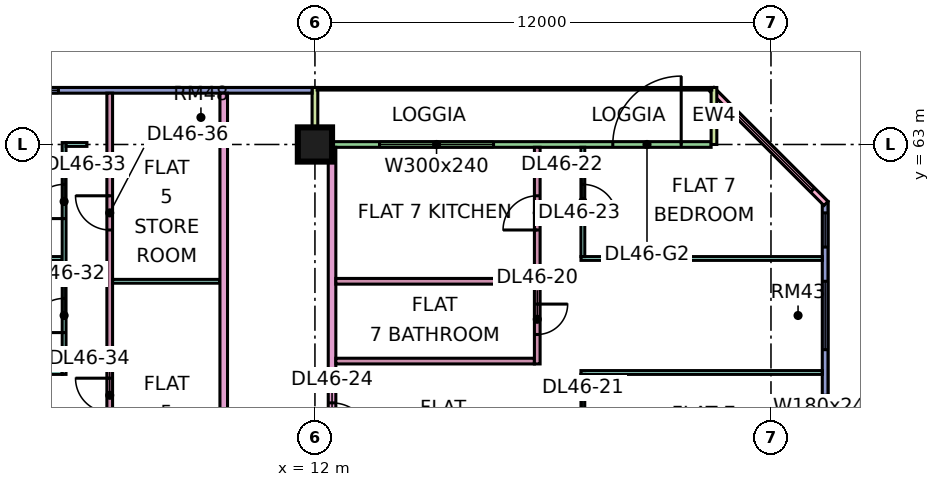
"""IFC4 building model, lengths in metres.
Left out: names, types, materials, properties, quantities, classifications, styles, units other than length and angle.
Written with IfcOpenShell. Run it as: python <this file> out.ifc"""

import sys

from ifc_helpers import new_model, si_unit, direction, frame, frame_2d, origin, origin_2d, place, context, subcontext, project, spatial, rectangle, extrude, element, fill, save


model = new_model("IFC4")
c1 = context("Model", 3, precision=1e-05, world=origin(), true_north=direction((0.0, 1.0)))
c2 = subcontext(c1, "Body", "Model", "MODEL_VIEW")
j1 = project(units=[si_unit("LENGTHUNIT", "METRE"), si_unit("PLANEANGLEUNIT", "RADIAN")], contexts=[c1])
p1 = place(None, origin())
s1 = spatial("IfcSite", under=j1, at=p1, CompositionType="ELEMENT")
p2 = place(p1, origin())
s2 = spatial("IfcBuilding", under=s1, at=p2, CompositionType="ELEMENT")
p3 = place(p2, frame((0.0, 0.0, 198.65)))
s3 = spatial("IfcBuildingStorey", under=s2, at=p3, CompositionType="ELEMENT", Elevation=198.65)
p4 = place(p3, frame((12.0, 63.0, 0.0), z_axis=(0.0, 0.0, 1.0), x_axis=(1.0, 0.0, 0.0)))
e1 = element("IfcColumn", 1, at=p4, inside=s3, PredefinedType="COLUMN", context=c2, shape_type="SweptSolid", body=[
    extrude(rectangle(XDim=0.9, YDim=0.9, at=origin_2d()), origin(), (0.0, 0.0, 1.0), 3.75),
])
p5 = place(p3, frame((25.425, 48.075, 0.0), z_axis=(0.0, 0.0, 1.0), x_axis=(0.0, 1.0, 0.0)))
e2 = element("IfcWall", 2, at=p5, inside=s3, PredefinedType="SOLIDWALL", context=c2, shape_type="SweptSolid", body=[
    extrude(rectangle(XDim=13.425, YDim=0.15, at=frame_2d((6.712, 0.0))), origin(), (0.0, 0.0, 1.0), 3.35),
])
p6 = place(p5, frame((0.562, 0.0, 0.45)))
e3 = element("IfcOpeningElement", 3, at=p6, cuts=e2, PredefinedType="OPENING", context=c2, shape_type="SweptSolid", body=[
    extrude(rectangle(XDim=4.8, YDim=2.4, at=frame_2d((2.4, 1.2))), frame((0.0, 0.085, 0.0), z_axis=(0.0, -1.0, 0.0), x_axis=(1.0, 0.0, 0.0)), (0.0, 0.0, 1.0), 0.17),
])
p7 = place(p5, frame((6.525, 0.0, 0.45)))
e4 = element("IfcOpeningElement", 4, at=p7, cuts=e2, PredefinedType="OPENING", context=c2, shape_type="SweptSolid", body=[
    extrude(rectangle(XDim=1.8, YDim=2.4, at=frame_2d((0.9, 1.2))), frame((0.0, 0.085, 0.0), z_axis=(0.0, -1.0, 0.0), x_axis=(1.0, 0.0, 0.0)), (0.0, 0.0, 1.0), 0.17),
])
p8 = place(p5, frame((9.525, 0.0, 0.45)))
e5 = element("IfcOpeningElement", 5, at=p8, cuts=e2, PredefinedType="OPENING", context=c2, shape_type="SweptSolid", body=[
    extrude(rectangle(XDim=1.8, YDim=2.4, at=frame_2d((0.9, 1.2))), frame((0.0, 0.085, 0.0), z_axis=(0.0, -1.0, 0.0), x_axis=(1.0, 0.0, 0.0)), (0.0, 0.0, 1.0), 0.17),
])
p9 = place(p5, frame((12.225, 0.0, 0.45)))
e6 = element("IfcOpeningElement", 6, at=p9, cuts=e2, PredefinedType="OPENING", context=c2, shape_type="SweptSolid", body=[
    extrude(rectangle(XDim=0.9, YDim=2.4, at=frame_2d((0.45, 1.2))), frame((0.0, 0.085, 0.0), z_axis=(0.0, -1.0, 0.0), x_axis=(1.0, 0.0, 0.0)), (0.0, 0.0, 1.0), 0.17),
])
p10 = place(p3, frame((25.447, 61.447, 0.0), z_axis=(0.0, 0.0, 1.0), x_axis=(-0.707106781187, 0.707106781187, 0.0)))
e7 = element("IfcWall", 7, at=p10, inside=s3, PredefinedType="SOLIDWALL", context=c2, shape_type="SweptSolid", body=[
    extrude(rectangle(XDim=4.243, YDim=0.15, at=frame_2d((2.121, 0.0))), origin(), (0.0, 0.0, 1.0), 3.35),
])
p11 = place(p10, frame((0.498, 0.0, 0.45)))
e8 = element("IfcOpeningElement", 8, at=p11, cuts=e7, PredefinedType="OPENING", context=c2, shape_type="SweptSolid", body=[
    extrude(rectangle(XDim=3.0, YDim=2.4, at=frame_2d((1.5, 1.2))), frame((0.0, 0.085, 0.0), z_axis=(0.0, -1.0, 0.0), x_axis=(1.0, 0.0, 0.0)), (0.0, 0.0, 1.0), 0.17),
])
p12 = place(p3, frame((22.425, 63.0, 0.0), z_axis=(0.0, 0.0, 1.0), x_axis=(-1.0, 0.0, 0.0)))
e9 = element("IfcWall", 9, at=p12, inside=s3, PredefinedType="SOLIDWALL", context=c2, shape_type="SweptSolid", body=[
    extrude(rectangle(XDim=10.35, YDim=0.15, at=frame_2d((5.175, 0.0))), origin(), (0.0, 0.0, 1.0), 3.35),
])
p13 = place(p12, frame((0.788, 0.0, 0.0)))
e10 = element("IfcOpeningElement", 10, at=p13, cuts=e9, PredefinedType="OPENING", context=c2, shape_type="SweptSolid", body=[
    extrude(rectangle(XDim=1.8, YDim=2.4, at=frame_2d((0.9, 1.2))), frame((0.0, 0.085, 0.0), z_axis=(0.0, -1.0, 0.0), x_axis=(1.0, 0.0, 0.0)), (0.0, 0.0, 1.0), 0.17),
])
p14 = place(p12, frame((5.725, 0.0, 0.45)))
e11 = element("IfcOpeningElement", 11, at=p14, cuts=e9, PredefinedType="OPENING", context=c2, shape_type="SweptSolid", body=[
    extrude(rectangle(XDim=3.0, YDim=2.4, at=frame_2d((1.5, 1.2))), frame((0.0, 0.085, 0.0), z_axis=(0.0, -1.0, 0.0), x_axis=(1.0, 0.0, 0.0)), (0.0, 0.0, 1.0), 0.17),
])
for number, where, z_axis, x_axis in (
    (12, (22.5, 64.5, 0.0), (0.0, 0.0, 1.0), (0.0, -1.0, 0.0)),
    (13, (12.0, 64.5, 0.0), (0.0, 0.0, 1.0), (0.0, -1.0, 0.0)),
):
    element("IfcWall", number, at=place(p3, frame(where, z_axis=z_axis, x_axis=x_axis)), inside=s3, PredefinedType="SOLIDWALL", context=c2, shape_type="SweptSolid", body=[
        extrude(rectangle(XDim=1.5, YDim=0.15, at=frame_2d((0.75, 0.0))), origin(), (0.0, 0.0, 1.0), 3.35),
    ])
p15 = place(p3, frame((11.925, 64.425, 0.0), z_axis=(0.0, 0.0, 1.0), x_axis=(-1.0, 0.0, 0.0)))
e14 = element("IfcWall", 14, at=p15, inside=s3, PredefinedType="SOLIDWALL", context=c2, shape_type="SweptSolid", body=[
    extrude(rectangle(XDim=10.425, YDim=0.15, at=frame_2d((5.212, 0.0))), origin(), (0.0, 0.0, 1.0), 3.35),
])
p16 = place(p15, frame((6.675, 0.0, 0.45)))
e15 = element("IfcOpeningElement", 15, at=p16, cuts=e14, PredefinedType="OPENING", context=c2, shape_type="SweptSolid", body=[
    extrude(rectangle(XDim=3.0, YDim=2.4, at=frame_2d((1.5, 1.2))), frame((0.0, 0.085, 0.0), z_axis=(0.0, -1.0, 0.0), x_axis=(1.0, 0.0, 0.0)), (0.0, 0.0, 1.0), 0.17),
])
p17 = place(p3, frame((-1.351, 60.0, 0.0), z_axis=(0.0, 0.0, 1.0), x_axis=(1.0, 0.0, 0.0)))
e16 = element("IfcWall", 16, at=p17, inside=s3, PredefinedType="PARTITIONING", context=c2, shape_type="SweptSolid", body=[
    extrude(rectangle(XDim=6.701, YDim=0.1, at=frame_2d((3.351, 0.0))), origin(), (0.0, 0.0, 1.0), 3.35),
])
p18 = place(p3, frame((-1.35, 57.0, 0.0), z_axis=(0.0, 0.0, 1.0), x_axis=(1.0, 0.0, 0.0)))
e17 = element("IfcWall", 17, at=p18, inside=s3, PredefinedType="PARTITIONING", context=c2, shape_type="SweptSolid", body=[
    extrude(rectangle(XDim=6.7, YDim=0.1, at=frame_2d((3.35, 0.0))), origin(), (0.0, 0.0, 1.0), 3.35),
])
p19 = place(p3, frame((5.4, 56.95, 0.0), z_axis=(0.0, 0.0, 1.0), x_axis=(0.0, 1.0, 0.0)))
e18 = element("IfcWall", 18, at=p19, inside=s3, PredefinedType="PARTITIONING", context=c2, shape_type="SweptSolid", body=[
    extrude(rectangle(XDim=6.1, YDim=0.1, at=frame_2d((3.05, 0.0))), origin(), (0.0, 0.0, 1.0), 3.35),
])
p20 = place(p19, frame((1.1, 0.0, 0.0)))
e19 = element("IfcOpeningElement", 19, at=p20, cuts=e18, PredefinedType="OPENING", context=c2, shape_type="SweptSolid", body=[
    extrude(rectangle(XDim=0.9, YDim=2.1, at=frame_2d((0.45, 1.05))), frame((0.0, 0.06, 0.0), z_axis=(0.0, -1.0, 0.0), x_axis=(1.0, 0.0, 0.0)), (0.0, 0.0, 1.0), 0.12),
])
p21 = place(p19, frame((4.1, 0.0, 0.0)))
e20 = element("IfcOpeningElement", 20, at=p21, cuts=e18, PredefinedType="OPENING", context=c2, shape_type="SweptSolid", body=[
    extrude(rectangle(XDim=0.9, YDim=2.1, at=frame_2d((0.45, 1.05))), frame((0.0, 0.06, 0.0), z_axis=(0.0, -1.0, 0.0), x_axis=(1.0, 0.0, 0.0)), (0.0, 0.0, 1.0), 0.12),
])
p22 = place(p3, frame((5.45, 63.0, 0.0), z_axis=(0.0, 0.0, 1.0), x_axis=(1.0, 0.0, 0.0)))
e21 = element("IfcWall", 21, at=p22, inside=s3, PredefinedType="PARTITIONING", context=c2, shape_type="SweptSolid", body=[
    extrude(rectangle(XDim=0.55, YDim=0.1, at=frame_2d((0.275, 0.0))), origin(), (0.0, 0.0, 1.0), 3.35),
])
p23 = place(p3, frame((6.6, 51.225, 0.0), z_axis=(0.0, 0.0, 1.0), x_axis=(0.0, 1.0, 0.0)))
e22 = element("IfcWall", 22, at=p23, inside=s3, PredefinedType="PARTITIONING", context=c2, shape_type="SweptSolid", body=[
    extrude(rectangle(XDim=13.125, YDim=0.15, at=frame_2d((6.562, 0.0))), origin(), (0.0, 0.0, 1.0), 3.35),
])
p24 = place(p23, frame((4.725, 0.0, 0.0)))
e23 = element("IfcOpeningElement", 23, at=p24, cuts=e22, PredefinedType="OPENING", context=c2, shape_type="SweptSolid", body=[
    extrude(rectangle(XDim=0.9, YDim=2.1, at=frame_2d((0.45, 1.05))), frame((0.0, 0.085, 0.0), z_axis=(0.0, -1.0, 0.0), x_axis=(1.0, 0.0, 0.0)), (0.0, 0.0, 1.0), 0.17),
])
p25 = place(p23, frame((9.525, 0.0, 0.0)))
e24 = element("IfcOpeningElement", 24, at=p25, cuts=e22, PredefinedType="OPENING", context=c2, shape_type="SweptSolid", body=[
    extrude(rectangle(XDim=0.9, YDim=2.1, at=frame_2d((0.45, 1.05))), frame((0.0, 0.085, 0.0), z_axis=(0.0, -1.0, 0.0), x_axis=(1.0, 0.0, 0.0)), (0.0, 0.0, 1.0), 0.17),
])
p26 = place(p3, frame((6.675, 59.4, 0.0), z_axis=(0.0, 0.0, 1.0), x_axis=(1.0, 0.0, 0.0)))
e25 = element("IfcWall", 25, at=p26, inside=s3, PredefinedType="PARTITIONING", context=c2, shape_type="SweptSolid", body=[
    extrude(rectangle(XDim=2.825, YDim=0.1, at=frame_2d((1.413, 0.0))), origin(), (0.0, 0.0, 1.0), 3.35),
])
p27 = place(p3, frame((9.6, 20.0, 0.0), z_axis=(0.0, 0.0, 1.0), x_axis=(0.0, 1.0, 0.0)))
e26 = element("IfcWall", 26, at=p27, inside=s3, PredefinedType="PARTITIONING", context=c2, shape_type="SweptSolid", body=[
    extrude(rectangle(XDim=44.35, YDim=0.2, at=frame_2d((22.175, 0.0))), origin(), (0.0, 0.0, 1.0), 3.35),
])
p28 = place(p27, frame((17.1, 0.0, 0.0)))
e27 = element("IfcOpeningElement", 27, at=p28, cuts=e26, PredefinedType="OPENING", context=c2, shape_type="SweptSolid", body=[
    extrude(rectangle(XDim=1.0, YDim=2.1, at=frame_2d((0.5, 1.05))), frame((0.0, 0.11, 0.0), z_axis=(0.0, -1.0, 0.0), x_axis=(1.0, 0.0, 0.0)), (0.0, 0.0, 1.0), 0.22),
])
p29 = place(p27, frame((29.1, 0.0, 0.0)))
e28 = element("IfcOpeningElement", 28, at=p29, cuts=e26, PredefinedType="OPENING", context=c2, shape_type="SweptSolid", body=[
    extrude(rectangle(XDim=1.0, YDim=2.1, at=frame_2d((0.5, 1.05))), frame((0.0, 0.11, 0.0), z_axis=(0.0, -1.0, 0.0), x_axis=(1.0, 0.0, 0.0)), (0.0, 0.0, 1.0), 0.22),
])
p30 = place(p27, frame((0.6, 0.0, 0.0)))
e29 = element("IfcOpeningElement", 29, at=p30, cuts=e26, PredefinedType="OPENING", context=c2, shape_type="SweptSolid", body=[
    extrude(rectangle(XDim=1.2, YDim=2.1, at=frame_2d((0.6, 1.05))), frame((0.0, 0.11, 0.0), z_axis=(0.0, -1.0, 0.0), x_axis=(1.0, 0.0, 0.0)), (0.0, 0.0, 1.0), 0.22),
])
p31 = place(p27, frame((4.35, 0.0, 0.0)))
e30 = element("IfcOpeningElement", 30, at=p31, cuts=e26, PredefinedType="OPENING", context=c2, shape_type="SweptSolid", body=[
    extrude(rectangle(XDim=1.0, YDim=2.1, at=frame_2d((0.5, 1.05))), frame((0.0, 0.11, 0.0), z_axis=(0.0, -1.0, 0.0), x_axis=(1.0, 0.0, 0.0)), (0.0, 0.0, 1.0), 0.22),
])
p32 = place(p3, frame((12.45, 20.0, 0.0), z_axis=(0.0, 0.0, 1.0), x_axis=(0.0, 1.0, 0.0)))
e31 = element("IfcWall", 31, at=p32, inside=s3, PredefinedType="PARTITIONING", context=c2, shape_type="SweptSolid", body=[
    extrude(rectangle(XDim=42.926, YDim=0.2, at=frame_2d((21.463, 0.0))), origin(), (0.0, 0.0, 1.0), 3.35),
])
p33 = place(p32, frame((7.15, 0.0, 0.0)))
e32 = element("IfcOpeningElement", 32, at=p33, cuts=e31, PredefinedType="OPENING", context=c2, shape_type="SweptSolid", body=[
    extrude(rectangle(XDim=1.6, YDim=2.1, at=frame_2d((0.8, 1.05))), frame((0.0, 0.11, 0.0), z_axis=(0.0, -1.0, 0.0), x_axis=(1.0, 0.0, 0.0)), (0.0, 0.0, 1.0), 0.22),
])
p34 = place(p32, frame((13.5, 0.0, 0.0)))
e33 = element("IfcOpeningElement", 33, at=p34, cuts=e31, PredefinedType="OPENING", context=c2, shape_type="SweptSolid", body=[
    extrude(rectangle(XDim=1.0, YDim=2.1, at=frame_2d((0.5, 1.05))), frame((0.0, 0.11, 0.0), z_axis=(0.0, -1.0, 0.0), x_axis=(1.0, 0.0, 0.0)), (0.0, 0.0, 1.0), 0.22),
])
p35 = place(p32, frame((17.2, 0.0, 0.0)))
e34 = element("IfcOpeningElement", 34, at=p35, cuts=e31, PredefinedType="OPENING", context=c2, shape_type="SweptSolid", body=[
    extrude(rectangle(XDim=1.0, YDim=2.1, at=frame_2d((0.5, 1.05))), frame((0.0, 0.11, 0.0), z_axis=(0.0, -1.0, 0.0), x_axis=(1.0, 0.0, 0.0)), (0.0, 0.0, 1.0), 0.22),
])
p36 = place(p32, frame((35.2, 0.0, 0.0)))
e35 = element("IfcOpeningElement", 35, at=p36, cuts=e31, PredefinedType="OPENING", context=c2, shape_type="SweptSolid", body=[
    extrude(rectangle(XDim=1.0, YDim=2.1, at=frame_2d((0.5, 1.05))), frame((0.0, 0.11, 0.0), z_axis=(0.0, -1.0, 0.0), x_axis=(1.0, 0.0, 0.0)), (0.0, 0.0, 1.0), 0.22),
])
p37 = place(p32, frame((1.15, 0.0, 0.0)))
e36 = element("IfcOpeningElement", 36, at=p37, cuts=e31, PredefinedType="OPENING", context=c2, shape_type="SweptSolid", body=[
    extrude(rectangle(XDim=1.8, YDim=2.1, at=frame_2d((0.9, 1.05))), frame((0.0, 0.11, 0.0), z_axis=(0.0, -1.0, 0.0), x_axis=(1.0, 0.0, 0.0)), (0.0, 0.0, 1.0), 0.22),
])
p38 = place(p32, frame((28.6, 0.0, 0.0)))
e37 = element("IfcOpeningElement", 37, at=p38, cuts=e31, PredefinedType="OPENING", context=c2, shape_type="SweptSolid", body=[
    extrude(rectangle(XDim=1.8, YDim=2.1, at=frame_2d((0.9, 1.05))), frame((0.0, 0.11, 0.0), z_axis=(0.0, -1.0, 0.0), x_axis=(1.0, 0.0, 0.0)), (0.0, 0.0, 1.0), 0.22),
])
for number, where, z_axis, x_axis in (
    (38, (12.55, 57.3, 0.0), (0.0, 0.0, 1.0), (1.0, 0.0, 0.0)),
    (39, (12.55, 59.4, 0.0), (0.0, 0.0, 1.0), (1.0, 0.0, 0.0)),
):
    element("IfcWall", number, at=place(p3, frame(where, z_axis=z_axis, x_axis=x_axis)), inside=s3, PredefinedType="PARTITIONING", context=c2, shape_type="SweptSolid", body=[
        extrude(rectangle(XDim=5.225, YDim=0.15, at=frame_2d((2.612, 0.0))), origin(), (0.0, 0.0, 1.0), 3.35),
    ])
p39 = place(p3, frame((17.85, 57.225, 0.0), z_axis=(0.0, 0.0, 1.0), x_axis=(0.0, 1.0, 0.0)))
e40 = element("IfcWall", 40, at=p39, inside=s3, PredefinedType="PARTITIONING", context=c2, shape_type="SweptSolid", body=[
    extrude(rectangle(XDim=5.701, YDim=0.15, at=frame_2d((2.851, 0.0))), origin(), (0.0, 0.0, 1.0), 3.35),
])
p40 = place(p39, frame((0.775, 0.0, 0.0)))
e41 = element("IfcOpeningElement", 41, at=p40, cuts=e40, PredefinedType="OPENING", context=c2, shape_type="SweptSolid", body=[
    extrude(rectangle(XDim=0.8, YDim=2.1, at=frame_2d((0.4, 1.05))), frame((0.0, 0.085, 0.0), z_axis=(0.0, -1.0, 0.0), x_axis=(1.0, 0.0, 0.0)), (0.0, 0.0, 1.0), 0.17),
])
p41 = place(p39, frame((3.525, 0.0, 0.0)))
e42 = element("IfcOpeningElement", 42, at=p41, cuts=e40, PredefinedType="OPENING", context=c2, shape_type="SweptSolid", body=[
    extrude(rectangle(XDim=0.9, YDim=2.1, at=frame_2d((0.45, 1.05))), frame((0.0, 0.085, 0.0), z_axis=(0.0, -1.0, 0.0), x_axis=(1.0, 0.0, 0.0)), (0.0, 0.0, 1.0), 0.17),
])
for number, where, z_axis, x_axis in (
    (43, (19.0, 57.0, 0.0), (0.0, 0.0, 1.0), (1.0, 0.0, 0.0)),
    (44, (19.0, 60.0, 0.0), (0.0, 0.0, 1.0), (1.0, 0.0, 0.0)),
):
    element("IfcWall", number, at=place(p3, frame(where, z_axis=z_axis, x_axis=x_axis)), inside=s3, PredefinedType="PARTITIONING", context=c2, shape_type="SweptSolid", body=[
        extrude(rectangle(XDim=6.35, YDim=0.1, at=frame_2d((3.175, 0.0))), origin(), (0.0, 0.0, 1.0), 3.35),
    ])
p42 = place(p3, frame((19.05, 54.1, 0.0), z_axis=(0.0, 0.0, 1.0), x_axis=(0.0, 1.0, 0.0)))
e45 = element("IfcWall", 45, at=p42, inside=s3, PredefinedType="PARTITIONING", context=c2, shape_type="SweptSolid", body=[
    extrude(rectangle(XDim=2.85, YDim=0.1, at=frame_2d((1.425, 0.0))), origin(), (0.0, 0.0, 1.0), 3.35),
])
p43 = place(p42, frame((0.95, 0.0, 0.0)))
e46 = element("IfcOpeningElement", 46, at=p43, cuts=e45, PredefinedType="OPENING", context=c2, shape_type="SweptSolid", body=[
    extrude(rectangle(XDim=0.9, YDim=2.1, at=frame_2d((0.45, 1.05))), frame((0.0, 0.06, 0.0), z_axis=(0.0, -1.0, 0.0), x_axis=(1.0, 0.0, 0.0)), (0.0, 0.0, 1.0), 0.12),
])
p44 = place(p3, frame((19.05, 60.05, 0.0), z_axis=(0.0, 0.0, 1.0), x_axis=(0.0, 1.0, 0.0)))
e47 = element("IfcWall", 47, at=p44, inside=s3, PredefinedType="PARTITIONING", context=c2, shape_type="SweptSolid", body=[
    extrude(rectangle(XDim=2.876, YDim=0.1, at=frame_2d((1.438, 0.0))), origin(), (0.0, 0.0, 1.0), 3.35),
])
p45 = place(p44, frame((1.0, 0.0, 0.0)))
e48 = element("IfcOpeningElement", 48, at=p45, cuts=e47, PredefinedType="OPENING", context=c2, shape_type="SweptSolid", body=[
    extrude(rectangle(XDim=0.9, YDim=2.1, at=frame_2d((0.45, 1.05))), frame((0.0, 0.06, 0.0), z_axis=(0.0, -1.0, 0.0), x_axis=(1.0, 0.0, 0.0)), (0.0, 0.0, 1.0), 0.12),
])
p46 = place(p7, origin())
e49 = element("IfcWindow", 49, at=p46, inside=s3, PartitioningType="SINGLE_PANEL", PredefinedType="WINDOW", context=c2, shape_type="SweptSolid", body=[
    extrude(rectangle(XDim=1.8, YDim=2.4, at=frame_2d((0.9, 1.2))), frame((0.0, 0.03, 0.0), z_axis=(0.0, -1.0, 0.0), x_axis=(1.0, 0.0, 0.0)), (0.0, 0.0, 1.0), 0.06),
])
fill(e4, e49)
p47 = place(p8, origin())
e50 = element("IfcWindow", 50, at=p47, inside=s3, PartitioningType="SINGLE_PANEL", PredefinedType="WINDOW", context=c2, shape_type="SweptSolid", body=[
    extrude(rectangle(XDim=1.8, YDim=2.4, at=frame_2d((0.9, 1.2))), frame((0.0, 0.03, 0.0), z_axis=(0.0, -1.0, 0.0), x_axis=(1.0, 0.0, 0.0)), (0.0, 0.0, 1.0), 0.06),
])
fill(e5, e50)
p48 = place(p9, origin())
e51 = element("IfcWindow", 51, at=p48, inside=s3, PartitioningType="SINGLE_PANEL", PredefinedType="WINDOW", context=c2, shape_type="SweptSolid", body=[
    extrude(rectangle(XDim=0.9, YDim=2.4, at=frame_2d((0.45, 1.2))), frame((0.0, 0.03, 0.0), z_axis=(0.0, -1.0, 0.0), x_axis=(1.0, 0.0, 0.0)), (0.0, 0.0, 1.0), 0.06),
])
fill(e6, e51)
p49 = place(p11, origin())
e52 = element("IfcWindow", 52, at=p49, inside=s3, PartitioningType="SINGLE_PANEL", PredefinedType="WINDOW", context=c2, shape_type="SweptSolid", body=[
    extrude(rectangle(XDim=3.0, YDim=2.4, at=frame_2d((1.5, 1.2))), frame((0.0, 0.03, 0.0), z_axis=(0.0, -1.0, 0.0), x_axis=(1.0, 0.0, 0.0)), (0.0, 0.0, 1.0), 0.06),
])
fill(e8, e52)
p50 = place(p13, frame((1.8, 0.0, 0.0), z_axis=(0.0, 0.0, 1.0), x_axis=(-1.0, 0.0, 0.0)))
e53 = element("IfcDoor", 53, at=p50, inside=s3, OperationType="DOUBLE_DOOR_SINGLE_SWING", PredefinedType="DOOR", context=c2, shape_type="SweptSolid", body=[
    extrude(rectangle(XDim=1.8, YDim=2.4, at=frame_2d((0.9, 1.2))), frame((0.0, 0.025, 0.0), z_axis=(0.0, -1.0, 0.0), x_axis=(1.0, 0.0, 0.0)), (0.0, 0.0, 1.0), 0.05),
])
fill(e10, e53)
p51 = place(p14, origin())
e54 = element("IfcWindow", 54, at=p51, inside=s3, PartitioningType="SINGLE_PANEL", PredefinedType="WINDOW", context=c2, shape_type="SweptSolid", body=[
    extrude(rectangle(XDim=3.0, YDim=2.4, at=frame_2d((1.5, 1.2))), frame((0.0, 0.03, 0.0), z_axis=(0.0, -1.0, 0.0), x_axis=(1.0, 0.0, 0.0)), (0.0, 0.0, 1.0), 0.06),
])
fill(e11, e54)
p52 = place(p16, origin())
e55 = element("IfcWindow", 55, at=p52, inside=s3, PartitioningType="SINGLE_PANEL", PredefinedType="WINDOW", context=c2, shape_type="SweptSolid", body=[
    extrude(rectangle(XDim=3.0, YDim=2.4, at=frame_2d((1.5, 1.2))), frame((0.0, 0.03, 0.0), z_axis=(0.0, -1.0, 0.0), x_axis=(1.0, 0.0, 0.0)), (0.0, 0.0, 1.0), 0.06),
])
fill(e15, e55)
p53 = place(p40, origin())
e56 = element("IfcDoor", 56, at=p53, inside=s3, OperationType="SINGLE_SWING_RIGHT", PredefinedType="DOOR", context=c2, shape_type="SweptSolid", body=[
    extrude(rectangle(XDim=0.8, YDim=2.1, at=frame_2d((0.4, 1.05))), frame((0.0, 0.025, 0.0), z_axis=(0.0, -1.0, 0.0), x_axis=(1.0, 0.0, 0.0)), (0.0, 0.0, 1.0), 0.05),
])
fill(e41, e56)
p54 = place(p45, frame((0.9, 0.0, 0.0), z_axis=(0.0, 0.0, 1.0), x_axis=(-1.0, 0.0, 0.0)))
e57 = element("IfcDoor", 57, at=p54, inside=s3, OperationType="SINGLE_SWING_LEFT", PredefinedType="DOOR", context=c2, shape_type="SweptSolid", body=[
    extrude(rectangle(XDim=0.9, YDim=2.1, at=frame_2d((0.45, 1.05))), frame((0.0, 0.025, 0.0), z_axis=(0.0, -1.0, 0.0), x_axis=(1.0, 0.0, 0.0)), (0.0, 0.0, 1.0), 0.05),
])
fill(e48, e57)
p55 = place(p41, origin())
e58 = element("IfcDoor", 58, at=p55, inside=s3, OperationType="SINGLE_SWING_LEFT", PredefinedType="DOOR", context=c2, shape_type="SweptSolid", body=[
    extrude(rectangle(XDim=0.9, YDim=2.1, at=frame_2d((0.45, 1.05))), frame((0.0, 0.025, 0.0), z_axis=(0.0, -1.0, 0.0), x_axis=(1.0, 0.0, 0.0)), (0.0, 0.0, 1.0), 0.05),
])
fill(e42, e58)
p56 = place(p36, frame((1.0, 0.0, 0.0), z_axis=(0.0, 0.0, 1.0), x_axis=(-1.0, 0.0, 0.0)))
e59 = element("IfcDoor", 59, at=p56, inside=s3, OperationType="SINGLE_SWING_LEFT", PredefinedType="DOOR", context=c2, shape_type="SweptSolid", body=[
    extrude(rectangle(XDim=1.0, YDim=2.1, at=frame_2d((0.5, 1.05))), frame((0.0, 0.025, 0.0), z_axis=(0.0, -1.0, 0.0), x_axis=(1.0, 0.0, 0.0)), (0.0, 0.0, 1.0), 0.05),
])
fill(e35, e59)
p57 = place(p20, origin())
e60 = element("IfcDoor", 60, at=p57, inside=s3, OperationType="SINGLE_SWING_LEFT", PredefinedType="DOOR", context=c2, shape_type="SweptSolid", body=[
    extrude(rectangle(XDim=0.9, YDim=2.1, at=frame_2d((0.45, 1.05))), frame((0.0, 0.025, 0.0), z_axis=(0.0, -1.0, 0.0), x_axis=(1.0, 0.0, 0.0)), (0.0, 0.0, 1.0), 0.05),
])
fill(e19, e60)
p58 = place(p21, origin())
e61 = element("IfcDoor", 61, at=p58, inside=s3, OperationType="SINGLE_SWING_LEFT", PredefinedType="DOOR", context=c2, shape_type="SweptSolid", body=[
    extrude(rectangle(XDim=0.9, YDim=2.1, at=frame_2d((0.45, 1.05))), frame((0.0, 0.025, 0.0), z_axis=(0.0, -1.0, 0.0), x_axis=(1.0, 0.0, 0.0)), (0.0, 0.0, 1.0), 0.05),
])
fill(e20, e61)
p59 = place(p24, frame((0.9, 0.0, 0.0), z_axis=(0.0, 0.0, 1.0), x_axis=(-1.0, 0.0, 0.0)))
e62 = element("IfcDoor", 62, at=p59, inside=s3, OperationType="SINGLE_SWING_RIGHT", PredefinedType="DOOR", context=c2, shape_type="SweptSolid", body=[
    extrude(rectangle(XDim=0.9, YDim=2.1, at=frame_2d((0.45, 1.05))), frame((0.0, 0.025, 0.0), z_axis=(0.0, -1.0, 0.0), x_axis=(1.0, 0.0, 0.0)), (0.0, 0.0, 1.0), 0.05),
])
fill(e23, e62)
p60 = place(p25, frame((0.9, 0.0, 0.0), z_axis=(0.0, 0.0, 1.0), x_axis=(-1.0, 0.0, 0.0)))
e63 = element("IfcDoor", 63, at=p60, inside=s3, OperationType="SINGLE_SWING_RIGHT", PredefinedType="DOOR", context=c2, shape_type="SweptSolid", body=[
    extrude(rectangle(XDim=0.9, YDim=2.1, at=frame_2d((0.45, 1.05))), frame((0.0, 0.025, 0.0), z_axis=(0.0, -1.0, 0.0), x_axis=(1.0, 0.0, 0.0)), (0.0, 0.0, 1.0), 0.05),
])
fill(e24, e63)
save(model, sys.argv[1])
